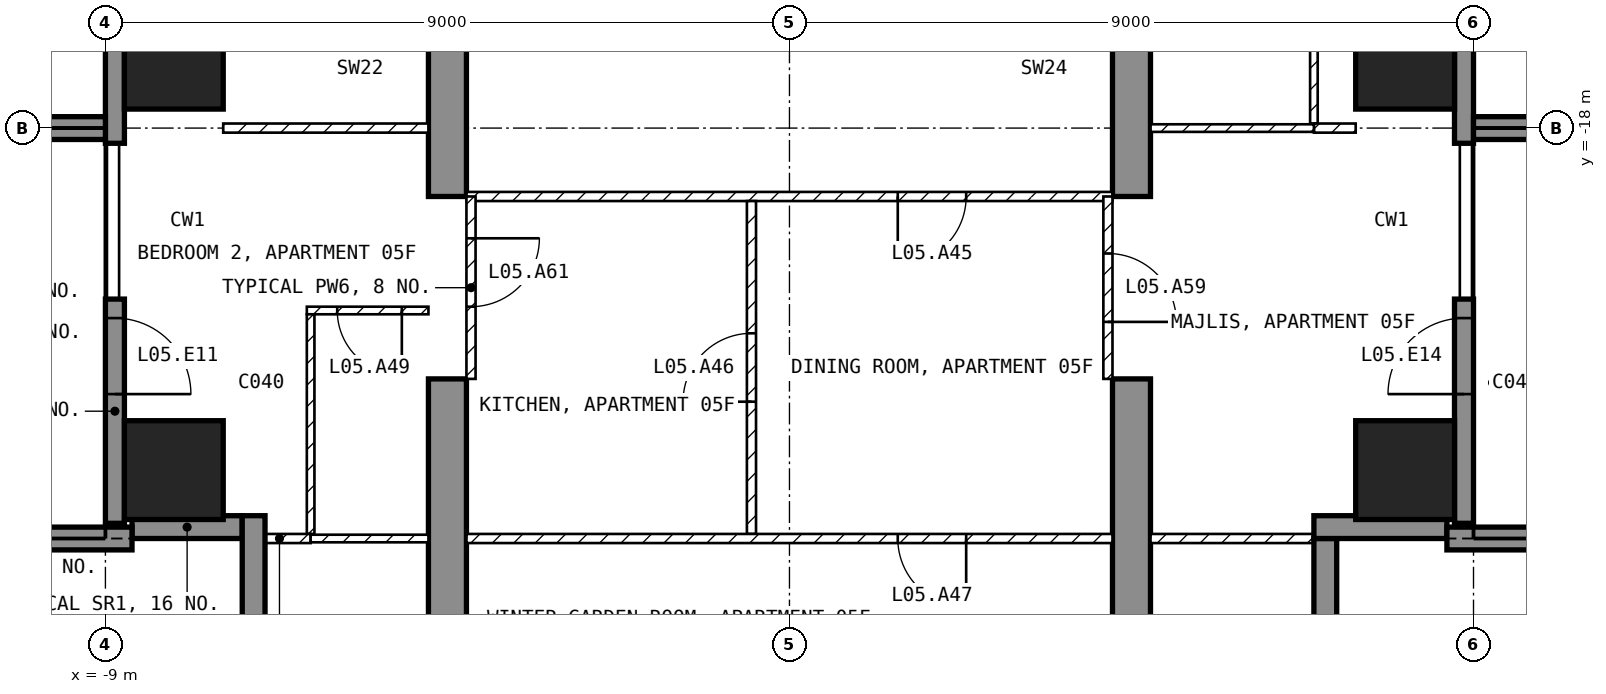
"""IFC4 building model, lengths in metres.
Left out: names, types, materials, properties, quantities, classifications, styles, units other than length and angle.
Written with IfcOpenShell. Run it as: python <this file> out.ifc"""

import sys

from ifc_helpers import new_model, si_unit, direction, frame, frame_2d, origin, origin_2d, place, context, subcontext, project, spatial, polyline, rectangle, outline, extrude, element, fill, save


model = new_model("IFC4")
c1 = context("Model", 3, precision=1e-05, world=origin(), true_north=direction((0.0, 1.0)))
c2 = subcontext(c1, "Body", "Model", "MODEL_VIEW")
j1 = project(units=[si_unit("LENGTHUNIT", "METRE"), si_unit("PLANEANGLEUNIT", "RADIAN")], contexts=[c1])
p1 = place(None, origin())
s1 = spatial("IfcSite", under=j1, at=p1, CompositionType="ELEMENT")
p2 = place(p1, origin())
s2 = spatial("IfcBuilding", under=s1, at=p2, CompositionType="ELEMENT")
p3 = place(p2, frame((0.0, 0.0, 36.5)))
s3 = spatial("IfcBuildingStorey", under=s2, at=p3, CompositionType="ELEMENT", Elevation=36.5)
for number, where, z_axis, x_axis in (
    (1, (-8.1, -22.5, -0.25), (0.0, 0.0, 1.0), (1.0, 0.0, 0.0)),
    (2, (-8.1, -17.1, -0.25), (0.0, 0.0, 1.0), (1.0, 0.0, 0.0)),
    (3, (8.1, -22.5, -0.25), (0.0, 0.0, 1.0), (1.0, 0.0, 0.0)),
    (4, (8.1, -17.1, -0.25), (0.0, 0.0, 1.0), (1.0, 0.0, 0.0)),
):
    element("IfcColumn", number, at=place(p3, frame(where, z_axis=z_axis, x_axis=x_axis)), inside=s3, PredefinedType="COLUMN", context=c2, shape_type="SweptSolid", body=[
        extrude(rectangle(XDim=1.3, YDim=1.3, at=origin_2d()), origin(), (0.0, 0.0, 1.0), 3.5),
    ])
for number, where, z_axis, x_axis in (
    (5, (-4.75, -25.45, -0.25), (1.0, 0.0, 0.0), (0.0, 1.0, 0.0)),
    (6, (4.25, -25.45, -0.25), (1.0, 0.0, 0.0), (0.0, 1.0, 0.0)),
):
    element("IfcWall", number, at=place(p3, frame(where, z_axis=z_axis, x_axis=x_axis)), inside=s3, PredefinedType="SHEAR", context=c2, shape_type="SweptSolid", body=[
        extrude(outline(polyline([(0.0, 0.0), (4.15, 0.0), (4.15, 2.65), (6.55, 2.65), (6.55, 0.0), (11.95, 0.0), (11.95, 2.65), (14.35, 2.65), (14.35, 0.0), (16.45, 0.0), (16.45, 3.5), (0.0, 3.5), (0.0, 0.0)])), origin(), (0.0, 0.0, 1.0), 0.5),
    ])
p4 = place(p3, frame((-8.875, -14.65, 0.0), z_axis=(0.0, 0.0, 1.0), x_axis=(0.0, -1.0, 0.0)))
e7 = element("IfcWall", 7, at=p4, inside=s3, PredefinedType="SOLIDWALL", context=c2, shape_type="SweptSolid", body=[
    extrude(rectangle(XDim=3.55, YDim=0.25, at=frame_2d((1.775, 0.0))), origin(), (0.0, 0.0, 1.0), 3.25),
])
p5 = place(p4, frame((0.25, 0.0, 0.0)))
e8 = element("IfcOpeningElement", 8, at=p5, cuts=e7, PredefinedType="OPENING", context=c2, shape_type="SweptSolid", body=[
    extrude(rectangle(XDim=1.2, YDim=2.4, at=frame_2d((0.6, 1.2))), frame((0.0, 0.135, 0.0), z_axis=(0.0, -1.0, 0.0), x_axis=(1.0, 0.0, 0.0)), (0.0, 0.0, 1.0), 0.27),
])
p6 = place(p3, frame((-8.875, -20.25, 0.0), z_axis=(0.0, 0.0, 1.0), x_axis=(0.0, -1.0, 0.0)))
e9 = element("IfcWall", 9, at=p6, inside=s3, PredefinedType="SOLIDWALL", context=c2, shape_type="SweptSolid", body=[
    extrude(rectangle(XDim=2.95, YDim=0.25, at=frame_2d((1.475, 0.0))), origin(), (0.0, 0.0, 1.0), 3.25),
])
p7 = place(p6, frame((0.25, 0.0, 0.0)))
e10 = element("IfcOpeningElement", 10, at=p7, cuts=e9, PredefinedType="OPENING", context=c2, shape_type="SweptSolid", body=[
    extrude(rectangle(XDim=1.0, YDim=2.4, at=frame_2d((0.5, 1.2))), frame((0.0, 0.135, 0.0), z_axis=(0.0, -1.0, 0.0), x_axis=(1.0, 0.0, 0.0)), (0.0, 0.0, 1.0), 0.27),
])
p8 = place(p3, frame((8.875, -23.2, 0.0), z_axis=(0.0, 0.0, 1.0), x_axis=(0.0, 1.0, 0.0)))
e11 = element("IfcWall", 11, at=p8, inside=s3, PredefinedType="SOLIDWALL", context=c2, shape_type="SweptSolid", body=[
    extrude(rectangle(XDim=2.95, YDim=0.25, at=frame_2d((1.475, 0.0))), origin(), (0.0, 0.0, 1.0), 3.25),
])
p9 = place(p8, frame((1.7, 0.0, 0.0)))
e12 = element("IfcOpeningElement", 12, at=p9, cuts=e11, PredefinedType="OPENING", context=c2, shape_type="SweptSolid", body=[
    extrude(rectangle(XDim=1.0, YDim=2.4, at=frame_2d((0.5, 1.2))), frame((0.0, 0.135, 0.0), z_axis=(0.0, -1.0, 0.0), x_axis=(1.0, 0.0, 0.0)), (0.0, 0.0, 1.0), 0.27),
])
p10 = place(p3, frame((8.875, -18.2, 0.0), z_axis=(0.0, 0.0, 1.0), x_axis=(0.0, 1.0, 0.0)))
e13 = element("IfcWall", 13, at=p10, inside=s3, PredefinedType="SOLIDWALL", context=c2, shape_type="SweptSolid", body=[
    extrude(rectangle(XDim=3.55, YDim=0.25, at=frame_2d((1.775, 0.0))), origin(), (0.0, 0.0, 1.0), 3.25),
])
p11 = place(p10, frame((2.1, 0.0, 0.0)))
e14 = element("IfcOpeningElement", 14, at=p11, cuts=e13, PredefinedType="OPENING", context=c2, shape_type="SweptSolid", body=[
    extrude(rectangle(XDim=1.2, YDim=2.4, at=frame_2d((0.6, 1.2))), frame((0.0, 0.135, 0.0), z_axis=(0.0, -1.0, 0.0), x_axis=(1.0, 0.0, 0.0)), (0.0, 0.0, 1.0), 0.27),
])
p12 = place(p3, frame((7.05, -25.2, 0.0), z_axis=(0.0, 0.0, 1.0), x_axis=(0.0, 1.0, 0.0)))
e15 = element("IfcWall", 15, at=p12, inside=s3, PredefinedType="SOLIDWALL", context=c2, shape_type="SweptSolid", body=[
    extrude(rectangle(XDim=1.8, YDim=0.3, at=frame_2d((0.9, 0.0))), origin(), (0.0, 0.0, 1.0), 3.25),
])
p13 = place(p3, frame((6.9, -23.25, 0.0), z_axis=(0.0, 0.0, 1.0), x_axis=(1.0, 0.0, 0.0)))
e16 = element("IfcWall", 16, at=p13, inside=s3, PredefinedType="SOLIDWALL", context=c2, shape_type="SweptSolid", body=[
    extrude(rectangle(XDim=1.75, YDim=0.3, at=frame_2d((0.875, 0.0))), origin(), (0.0, 0.0, 1.0), 3.25),
])
p14 = place(p3, frame((-8.65, -23.25, 0.0), z_axis=(0.0, 0.0, 1.0), x_axis=(1.0, 0.0, 0.0)))
e17 = element("IfcWall", 17, at=p14, inside=s3, PredefinedType="SOLIDWALL", context=c2, shape_type="SweptSolid", body=[
    extrude(rectangle(XDim=1.45, YDim=0.3, at=frame_2d((0.725, 0.0))), origin(), (0.0, 0.0, 1.0), 3.25),
])
p15 = place(p3, frame((-7.05, -23.1, 0.0), z_axis=(0.0, 0.0, 1.0), x_axis=(0.0, -1.0, 0.0)))
e18 = element("IfcWall", 18, at=p15, inside=s3, PredefinedType="SOLIDWALL", context=c2, shape_type="SweptSolid", body=[
    extrude(rectangle(XDim=1.8, YDim=0.3, at=frame_2d((0.9, 0.0))), origin(), (0.0, 0.0, 1.0), 3.25),
])
p16 = place(p3, frame((-8.65, -23.4, 0.0), z_axis=(0.0, 0.0, 1.0), x_axis=(-1.0, 0.0, 0.0)))
e19 = element("IfcWall", 19, at=p16, inside=s3, PredefinedType="SOLIDWALL", context=c2, shape_type="SweptSolid", body=[
    extrude(rectangle(XDim=3.05, YDim=0.3, at=frame_2d((1.525, 0.0))), origin(), (0.0, 0.0, 1.0), 3.25),
])
p17 = place(p3, frame((-9.0, -18.0, 0.0), z_axis=(0.0, 0.0, 1.0), x_axis=(-1.0, 0.0, 0.0)))
e20 = element("IfcWall", 20, at=p17, inside=s3, PredefinedType="SOLIDWALL", context=c2, shape_type="SweptSolid", body=[
    extrude(rectangle(XDim=2.7, YDim=0.3, at=frame_2d((1.35, 0.0))), origin(), (0.0, 0.0, 1.0), 3.25),
])
p18 = place(p3, frame((8.65, -23.4, 0.0), z_axis=(0.0, 0.0, 1.0), x_axis=(1.0, 0.0, 0.0)))
e21 = element("IfcWall", 21, at=p18, inside=s3, PredefinedType="SOLIDWALL", context=c2, shape_type="SweptSolid", body=[
    extrude(rectangle(XDim=3.05, YDim=0.3, at=frame_2d((1.525, 0.0))), origin(), (0.0, 0.0, 1.0), 3.25),
])
p19 = place(p3, frame((9.0, -18.0, 0.0), z_axis=(0.0, 0.0, 1.0), x_axis=(1.0, 0.0, 0.0)))
e22 = element("IfcWall", 22, at=p19, inside=s3, PredefinedType="SOLIDWALL", context=c2, shape_type="SweptSolid", body=[
    extrude(rectangle(XDim=2.7, YDim=0.3, at=frame_2d((1.35, 0.0))), origin(), (0.0, 0.0, 1.0), 3.25),
])
p20 = place(p3, frame((4.25, -18.9, 0.0), z_axis=(0.0, 0.0, 1.0), x_axis=(-1.0, 0.0, 0.0)))
e23 = element("IfcWall", 23, at=p20, inside=s3, PredefinedType="PARTITIONING", context=c2, shape_type="SweptSolid", body=[
    extrude(rectangle(XDim=8.5, YDim=0.12, at=frame_2d((4.25, 0.0))), origin(), (0.0, 0.0, 1.0), 3.25),
])
p21 = place(p20, frame((1.925, 0.0, 0.0)))
e24 = element("IfcOpeningElement", 24, at=p21, cuts=e23, PredefinedType="OPENING", context=c2, shape_type="SweptSolid", body=[
    extrude(rectangle(XDim=0.9, YDim=2.1, at=frame_2d((0.45, 1.05))), frame((0.0, 0.07, 0.0), z_axis=(0.0, -1.0, 0.0), x_axis=(1.0, 0.0, 0.0)), (0.0, 0.0, 1.0), 0.14),
])
p22 = place(p3, frame((-0.5, -23.34, 0.0), z_axis=(0.0, 0.0, 1.0), x_axis=(0.0, 1.0, 0.0)))
e25 = element("IfcWall", 25, at=p22, inside=s3, PredefinedType="PARTITIONING", context=c2, shape_type="SweptSolid", body=[
    extrude(rectangle(XDim=4.38, YDim=0.12, at=frame_2d((2.19, 0.0))), origin(), (0.0, 0.0, 1.0), 3.25),
])
p23 = place(p22, frame((1.74, 0.0, 0.0)))
e26 = element("IfcOpeningElement", 26, at=p23, cuts=e25, PredefinedType="OPENING", context=c2, shape_type="SweptSolid", body=[
    extrude(rectangle(XDim=0.9, YDim=2.1, at=frame_2d((0.45, 1.05))), frame((0.0, 0.07, 0.0), z_axis=(0.0, -1.0, 0.0), x_axis=(1.0, 0.0, 0.0)), (0.0, 0.0, 1.0), 0.14),
])
p24 = place(p3, frame((4.25, -23.4, 0.0), z_axis=(0.0, 0.0, 1.0), x_axis=(-1.0, 0.0, 0.0)))
e27 = element("IfcWall", 27, at=p24, inside=s3, PredefinedType="PARTITIONING", context=c2, shape_type="SweptSolid", body=[
    extrude(rectangle(XDim=8.5, YDim=0.12, at=frame_2d((4.25, 0.0))), origin(), (0.0, 0.0, 1.0), 3.25),
])
p25 = place(p24, frame((1.925, 0.0, 0.0)))
e28 = element("IfcOpeningElement", 28, at=p25, cuts=e27, PredefinedType="OPENING", context=c2, shape_type="SweptSolid", body=[
    extrude(rectangle(XDim=0.9, YDim=2.1, at=frame_2d((0.45, 1.05))), frame((0.0, 0.07, 0.0), z_axis=(0.0, -1.0, 0.0), x_axis=(1.0, 0.0, 0.0)), (0.0, 0.0, 1.0), 0.14),
])
p26 = place(p3, frame((6.9, -17.94, 0.0), z_axis=(0.0, 0.0, 1.0), x_axis=(0.0, 1.0, 0.0)))
e29 = element("IfcWall", 29, at=p26, inside=s3, PredefinedType="PARTITIONING", context=c2, shape_type="SweptSolid", body=[
    extrude(rectangle(XDim=3.49, YDim=0.1, at=frame_2d((1.745, 0.0))), origin(), (0.0, 0.0, 1.0), 3.25),
])
p27 = place(p3, frame((7.45, -18.0, 0.0), z_axis=(0.0, 0.0, 1.0), x_axis=(-1.0, 0.0, 0.0)))
e30 = element("IfcWall", 30, at=p27, inside=s3, PredefinedType="PARTITIONING", context=c2, shape_type="SweptSolid", body=[
    extrude(rectangle(XDim=0.55, YDim=0.12, at=frame_2d((0.275, 0.0))), origin(), (0.0, 0.0, 1.0), 3.25),
])
p28 = place(p3, frame((6.9, -18.0, 0.0), z_axis=(0.0, 0.0, 1.0), x_axis=(-1.0, 0.0, 0.0)))
e31 = element("IfcWall", 31, at=p28, inside=s3, PredefinedType="PARTITIONING", context=c2, shape_type="SweptSolid", body=[
    extrude(rectangle(XDim=2.15, YDim=0.1, at=frame_2d((1.075, 0.0))), origin(), (0.0, 0.0, 1.0), 3.25),
])
p29 = place(p3, frame((7.12, -23.4, 0.0), z_axis=(0.0, 0.0, 1.0), x_axis=(-1.0, 0.0, 0.0)))
e32 = element("IfcWall", 32, at=p29, inside=s3, PredefinedType="PARTITIONING", context=c2, shape_type="SweptSolid", body=[
    extrude(rectangle(XDim=2.37, YDim=0.12, at=frame_2d((1.185, 0.0))), origin(), (0.0, 0.0, 1.0), 3.25),
])
p30 = place(p3, frame((-4.75, -18.0, 0.0), z_axis=(0.0, 0.0, 1.0), x_axis=(-1.0, 0.0, 0.0)))
e33 = element("IfcWall", 33, at=p30, inside=s3, PredefinedType="PARTITIONING", context=c2, shape_type="SweptSolid", body=[
    extrude(rectangle(XDim=2.7, YDim=0.12, at=frame_2d((1.35, 0.0))), origin(), (0.0, 0.0, 1.0), 3.25),
])
p31 = place(p3, frame((-4.75, -20.4, 0.0), z_axis=(0.0, 0.0, 1.0), x_axis=(-1.0, 0.0, 0.0)))
e34 = element("IfcWall", 34, at=p31, inside=s3, PredefinedType="PARTITIONING", context=c2, shape_type="SweptSolid", body=[
    extrude(rectangle(XDim=1.6, YDim=0.1, at=frame_2d((0.8, 0.0))), origin(), (0.0, 0.0, 1.0), 3.25),
])
p32 = place(p31, frame((0.35, 0.0, 0.0)))
e35 = element("IfcOpeningElement", 35, at=p32, cuts=e34, PredefinedType="OPENING", context=c2, shape_type="SweptSolid", body=[
    extrude(rectangle(XDim=0.85, YDim=2.1, at=frame_2d((0.425, 1.05))), frame((0.0, 0.06, 0.0), z_axis=(0.0, -1.0, 0.0), x_axis=(1.0, 0.0, 0.0)), (0.0, 0.0, 1.0), 0.12),
])
p33 = place(p3, frame((-6.3, -20.45, 0.0), z_axis=(0.0, 0.0, 1.0), x_axis=(0.0, -1.0, 0.0)))
e36 = element("IfcWall", 36, at=p33, inside=s3, PredefinedType="PARTITIONING", context=c2, shape_type="SweptSolid", body=[
    extrude(rectangle(XDim=2.89, YDim=0.1, at=frame_2d((1.445, 0.0))), origin(), (0.0, 0.0, 1.0), 3.25),
])
p34 = place(p3, frame((-6.3, -23.4, 0.0), z_axis=(0.0, 0.0, 1.0), x_axis=(-1.0, 0.0, 0.0)))
e37 = element("IfcWall", 37, at=p34, inside=s3, PredefinedType="PARTITIONING", context=c2, shape_type="SweptSolid", body=[
    extrude(rectangle(XDim=0.82, YDim=0.12, at=frame_2d((0.41, 0.0))), origin(), (0.0, 0.0, 1.0), 3.25),
])
p35 = place(p3, frame((-4.75, -23.4, 0.0), z_axis=(0.0, 0.0, 1.0), x_axis=(-1.0, 0.0, 0.0)))
e38 = element("IfcWall", 38, at=p35, inside=s3, PredefinedType="PARTITIONING", context=c2, shape_type="SweptSolid", body=[
    extrude(rectangle(XDim=1.55, YDim=0.1, at=frame_2d((0.775, 0.0))), origin(), (0.0, 0.0, 1.0), 3.25),
])
p36 = place(p3, frame((4.19, -18.9, 0.0), z_axis=(0.0, 0.0, 1.0), x_axis=(0.0, -1.0, 0.0)))
e39 = element("IfcWall", 39, at=p36, inside=s3, PredefinedType="PARTITIONING", context=c2, shape_type="SweptSolid", body=[
    extrude(rectangle(XDim=2.4, YDim=0.12, at=frame_2d((1.2, 0.0))), origin(), (0.0, 0.0, 1.0), 2.4),
])
p37 = place(p36, frame((0.75, 0.0, 0.0)))
e40 = element("IfcOpeningElement", 40, at=p37, cuts=e39, PredefinedType="OPENING", context=c2, shape_type="SweptSolid", body=[
    extrude(rectangle(XDim=0.9, YDim=2.1, at=frame_2d((0.45, 1.05))), frame((0.0, 0.07, 0.0), z_axis=(0.0, -1.0, 0.0), x_axis=(1.0, 0.0, 0.0)), (0.0, 0.0, 1.0), 0.14),
])
p38 = place(p3, frame((-4.19, -18.9, 0.0), z_axis=(0.0, 0.0, 1.0), x_axis=(0.0, -1.0, 0.0)))
e41 = element("IfcWall", 41, at=p38, inside=s3, PredefinedType="PARTITIONING", context=c2, shape_type="SweptSolid", body=[
    extrude(rectangle(XDim=2.4, YDim=0.12, at=frame_2d((1.2, 0.0))), origin(), (0.0, 0.0, 1.0), 2.4),
])
p39 = place(p38, frame((0.55, 0.0, 0.0)))
e42 = element("IfcOpeningElement", 42, at=p39, cuts=e41, PredefinedType="OPENING", context=c2, shape_type="SweptSolid", body=[
    extrude(rectangle(XDim=0.9, YDim=2.1, at=frame_2d((0.45, 1.05))), frame((0.0, 0.07, 0.0), z_axis=(0.0, -1.0, 0.0), x_axis=(1.0, 0.0, 0.0)), (0.0, 0.0, 1.0), 0.14),
])
p40 = place(p7, origin())
e43 = element("IfcDoor", 43, at=p40, inside=s3, OperationType="SINGLE_SWING_RIGHT", PredefinedType="DOOR", context=c2, shape_type="SweptSolid", body=[
    extrude(rectangle(XDim=1.0, YDim=2.4, at=frame_2d((0.5, 1.2))), frame((0.0, 0.025, 0.0), z_axis=(0.0, -1.0, 0.0), x_axis=(1.0, 0.0, 0.0)), (0.0, 0.0, 1.0), 0.05),
])
fill(e10, e43)
p41 = place(p9, origin())
e44 = element("IfcDoor", 44, at=p41, inside=s3, OperationType="SINGLE_SWING_LEFT", PredefinedType="DOOR", context=c2, shape_type="SweptSolid", body=[
    extrude(rectangle(XDim=1.0, YDim=2.4, at=frame_2d((0.5, 1.2))), frame((0.0, 0.025, 0.0), z_axis=(0.0, -1.0, 0.0), x_axis=(1.0, 0.0, 0.0)), (0.0, 0.0, 1.0), 0.05),
])
fill(e12, e44)
p42 = place(p21, origin())
e45 = element("IfcDoor", 45, at=p42, inside=s3, OperationType="SINGLE_SWING_RIGHT", PredefinedType="DOOR", context=c2, shape_type="SweptSolid", body=[
    extrude(rectangle(XDim=0.9, YDim=2.1, at=frame_2d((0.45, 1.05))), frame((0.0, 0.025, 0.0), z_axis=(0.0, -1.0, 0.0), x_axis=(1.0, 0.0, 0.0)), (0.0, 0.0, 1.0), 0.05),
])
fill(e24, e45)
p43 = place(p23, origin())
e46 = element("IfcDoor", 46, at=p43, inside=s3, OperationType="SINGLE_SWING_LEFT", PredefinedType="DOOR", context=c2, shape_type="SweptSolid", body=[
    extrude(rectangle(XDim=0.9, YDim=2.1, at=frame_2d((0.45, 1.05))), frame((0.0, 0.025, 0.0), z_axis=(0.0, -1.0, 0.0), x_axis=(1.0, 0.0, 0.0)), (0.0, 0.0, 1.0), 0.05),
])
fill(e26, e46)
p44 = place(p25, origin())
e47 = element("IfcDoor", 47, at=p44, inside=s3, OperationType="SINGLE_SWING_LEFT", PredefinedType="DOOR", context=c2, shape_type="SweptSolid", body=[
    extrude(rectangle(XDim=0.9, YDim=2.1, at=frame_2d((0.45, 1.05))), frame((0.0, 0.025, 0.0), z_axis=(0.0, -1.0, 0.0), x_axis=(1.0, 0.0, 0.0)), (0.0, 0.0, 1.0), 0.05),
])
fill(e28, e47)
p45 = place(p32, origin())
e48 = element("IfcDoor", 48, at=p45, inside=s3, OperationType="SINGLE_SWING_LEFT", PredefinedType="DOOR", context=c2, shape_type="SweptSolid", body=[
    extrude(rectangle(XDim=0.85, YDim=2.1, at=frame_2d((0.425, 1.05))), frame((0.0, 0.025, 0.0), z_axis=(0.0, -1.0, 0.0), x_axis=(1.0, 0.0, 0.0)), (0.0, 0.0, 1.0), 0.05),
])
fill(e35, e48)
p46 = place(p37, origin())
e49 = element("IfcDoor", 49, at=p46, inside=s3, OperationType="SINGLE_SWING_RIGHT", PredefinedType="DOOR", context=c2, shape_type="SweptSolid", body=[
    extrude(rectangle(XDim=0.9, YDim=2.1, at=frame_2d((0.45, 1.05))), frame((0.0, 0.025, 0.0), z_axis=(0.0, -1.0, 0.0), x_axis=(1.0, 0.0, 0.0)), (0.0, 0.0, 1.0), 0.05),
])
fill(e40, e49)
p47 = place(p39, origin())
e50 = element("IfcDoor", 50, at=p47, inside=s3, OperationType="SINGLE_SWING_LEFT", PredefinedType="DOOR", context=c2, shape_type="SweptSolid", body=[
    extrude(rectangle(XDim=0.9, YDim=2.1, at=frame_2d((0.45, 1.05))), frame((0.0, 0.025, 0.0), z_axis=(0.0, -1.0, 0.0), x_axis=(1.0, 0.0, 0.0)), (0.0, 0.0, 1.0), 0.05),
])
fill(e42, e50)
save(model, sys.argv[1])
